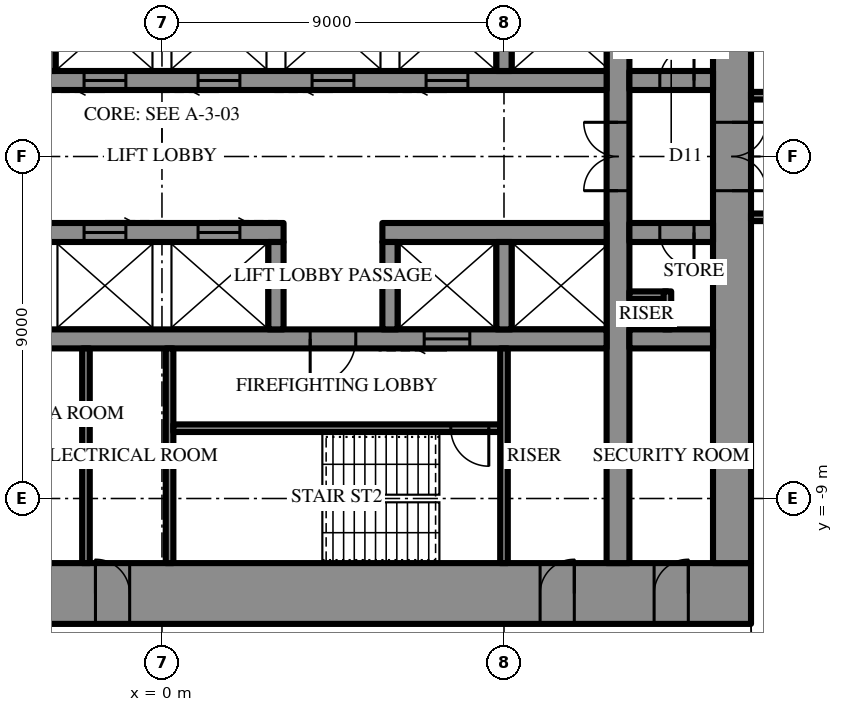
"""IFC4 building model, lengths in metres.
Left out: names, types, materials, properties, quantities, classifications, styles, units other than length and angle.
Written with IfcOpenShell. Run it as: python <this file> out.ifc"""

import sys

from ifc_helpers import new_model, si_unit, direction, frame, frame_2d, origin, place, context, subcontext, project, spatial, rectangle, extrude, element, fill, save


model = new_model("IFC4")
c1 = context("Model", 3, precision=1e-05, world=origin(), true_north=direction((0.0, 1.0)))
c2 = subcontext(c1, "Body", "Model", "MODEL_VIEW")
j1 = project(units=[si_unit("LENGTHUNIT", "METRE"), si_unit("PLANEANGLEUNIT", "RADIAN")], contexts=[c1])
p1 = place(None, origin())
s1 = spatial("IfcSite", under=j1, at=p1, CompositionType="ELEMENT")
p2 = place(p1, origin())
s2 = spatial("IfcBuilding", under=s1, at=p2, CompositionType="ELEMENT")
p3 = place(p2, frame((0.0, 0.0, 295.3)))
s3 = spatial("IfcBuildingStorey", under=s2, at=p3, CompositionType="ELEMENT", Elevation=295.3)
p4 = place(p3, frame((15.5, -11.5, 0.0), z_axis=(0.0, 0.0, 1.0), x_axis=(-1.0, 0.0, 0.0)))
e1 = element("IfcWall", 1, at=p4, inside=s3, PredefinedType="SHEAR", context=c2, shape_type="SweptSolid", body=[
    extrude(rectangle(XDim=31.0, YDim=1.6, at=frame_2d((15.5, 0.0))), origin(), (0.0, 0.0, 1.0), 4.2),
])
p5 = place(p4, frame((16.35, 0.0, 0.0)))
e2 = element("IfcOpeningElement", 2, at=p5, cuts=e1, PredefinedType="OPENING", context=c2, shape_type="SweptSolid", body=[
    extrude(rectangle(XDim=0.9, YDim=2.2, at=frame_2d((0.45, 1.1))), frame((0.0, 0.81, 0.0), z_axis=(0.0, -1.0, 0.0), x_axis=(1.0, 0.0, 0.0)), (0.0, 0.0, 1.0), 1.62),
])
p6 = place(p4, frame((19.35, 0.0, 0.0)))
e3 = element("IfcOpeningElement", 3, at=p6, cuts=e1, PredefinedType="OPENING", context=c2, shape_type="SweptSolid", body=[
    extrude(rectangle(XDim=0.9, YDim=2.2, at=frame_2d((0.45, 1.1))), frame((0.0, 0.81, 0.0), z_axis=(0.0, -1.0, 0.0), x_axis=(1.0, 0.0, 0.0)), (0.0, 0.0, 1.0), 1.62),
])
p7 = place(p4, frame((22.4, 0.0, 0.0)))
e4 = element("IfcOpeningElement", 4, at=p7, cuts=e1, PredefinedType="OPENING", context=c2, shape_type="SweptSolid", body=[
    extrude(rectangle(XDim=1.0, YDim=2.2, at=frame_2d((0.5, 1.1))), frame((0.0, 0.81, 0.0), z_axis=(0.0, -1.0, 0.0), x_axis=(1.0, 0.0, 0.0)), (0.0, 0.0, 1.0), 1.62),
])
p8 = place(p4, frame((1.65, 0.0, 0.0)))
e5 = element("IfcOpeningElement", 5, at=p8, cuts=e1, PredefinedType="OPENING", context=c2, shape_type="SweptSolid", body=[
    extrude(rectangle(XDim=0.9, YDim=2.2, at=frame_2d((0.45, 1.1))), frame((0.0, 0.81, 0.0), z_axis=(0.0, -1.0, 0.0), x_axis=(1.0, 0.0, 0.0)), (0.0, 0.0, 1.0), 1.62),
])
p9 = place(p4, frame((4.65, 0.0, 0.0)))
e6 = element("IfcOpeningElement", 6, at=p9, cuts=e1, PredefinedType="OPENING", context=c2, shape_type="SweptSolid", body=[
    extrude(rectangle(XDim=0.9, YDim=2.2, at=frame_2d((0.45, 1.1))), frame((0.0, 0.81, 0.0), z_axis=(0.0, -1.0, 0.0), x_axis=(1.0, 0.0, 0.0)), (0.0, 0.0, 1.0), 1.62),
])
p10 = place(p4, frame((25.45, 0.0, 0.0)))
e7 = element("IfcOpeningElement", 7, at=p10, cuts=e1, PredefinedType="OPENING", context=c2, shape_type="SweptSolid", body=[
    extrude(rectangle(XDim=0.9, YDim=2.2, at=frame_2d((0.45, 1.1))), frame((0.0, 0.81, 0.0), z_axis=(0.0, -1.0, 0.0), x_axis=(1.0, 0.0, 0.0)), (0.0, 0.0, 1.0), 1.62),
])
p11 = place(p4, frame((28.45, 0.0, 0.0)))
e8 = element("IfcOpeningElement", 8, at=p11, cuts=e1, PredefinedType="OPENING", context=c2, shape_type="SweptSolid", body=[
    extrude(rectangle(XDim=0.9, YDim=2.2, at=frame_2d((0.45, 1.1))), frame((0.0, 0.81, 0.0), z_axis=(0.0, -1.0, 0.0), x_axis=(1.0, 0.0, 0.0)), (0.0, 0.0, 1.0), 1.62),
])
p12 = place(p3, frame((15.0, -10.7, 0.0), z_axis=(0.0, 0.0, 1.0), x_axis=(0.0, 1.0, 0.0)))
e9 = element("IfcWall", 9, at=p12, inside=s3, PredefinedType="SHEAR", context=c2, shape_type="SweptSolid", body=[
    extrude(rectangle(XDim=21.4, YDim=1.0, at=frame_2d((10.7, 0.0))), origin(), (0.0, 0.0, 1.0), 4.2),
])
p13 = place(p12, frame((9.8, 0.0, 0.0)))
e10 = element("IfcOpeningElement", 10, at=p13, cuts=e9, PredefinedType="OPENING", context=c2, shape_type="SweptSolid", body=[
    extrude(rectangle(XDim=1.8, YDim=2.4, at=frame_2d((0.9, 1.2))), frame((0.0, 0.51, 0.0), z_axis=(0.0, -1.0, 0.0), x_axis=(1.0, 0.0, 0.0)), (0.0, 0.0, 1.0), 1.02),
])
p14 = place(p3, frame((12.0, -10.7, 0.0), z_axis=(0.0, 0.0, 1.0), x_axis=(0.0, 1.0, 0.0)))
e11 = element("IfcWall", 11, at=p14, inside=s3, PredefinedType="SHEAR", context=c2, shape_type="SweptSolid", body=[
    extrude(rectangle(XDim=21.4, YDim=0.6, at=frame_2d((10.7, 0.0))), origin(), (0.0, 0.0, 1.0), 4.2),
])
p15 = place(p14, frame((9.8, 0.0, 0.0)))
e12 = element("IfcOpeningElement", 12, at=p15, cuts=e11, PredefinedType="OPENING", context=c2, shape_type="SweptSolid", body=[
    extrude(rectangle(XDim=1.8, YDim=2.4, at=frame_2d((0.9, 1.2))), frame((0.0, 0.31, 0.0), z_axis=(0.0, -1.0, 0.0), x_axis=(1.0, 0.0, 0.0)), (0.0, 0.0, 1.0), 0.62),
])
p16 = place(p3, frame((-3.2, 2.0, 0.0), z_axis=(0.0, 0.0, 1.0), x_axis=(1.0, 0.0, 0.0)))
e13 = element("IfcWall", 13, at=p16, inside=s3, PredefinedType="SHEAR", context=c2, shape_type="SweptSolid", body=[
    extrude(rectangle(XDim=14.9, YDim=0.5, at=frame_2d((7.45, 0.0))), origin(), (0.0, 0.0, 1.0), 4.2),
])
p17 = place(p16, frame((1.15, 0.0, 0.0)))
e14 = element("IfcOpeningElement", 14, at=p17, cuts=e13, PredefinedType="OPENING", context=c2, shape_type="SweptSolid", body=[
    extrude(rectangle(XDim=1.1, YDim=2.2, at=frame_2d((0.55, 1.1))), frame((0.0, 0.26, 0.0), z_axis=(0.0, -1.0, 0.0), x_axis=(1.0, 0.0, 0.0)), (0.0, 0.0, 1.0), 0.52),
])
p18 = place(p16, frame((4.15, 0.0, 0.0)))
e15 = element("IfcOpeningElement", 15, at=p18, cuts=e13, PredefinedType="OPENING", context=c2, shape_type="SweptSolid", body=[
    extrude(rectangle(XDim=1.1, YDim=2.2, at=frame_2d((0.55, 1.1))), frame((0.0, 0.26, 0.0), z_axis=(0.0, -1.0, 0.0), x_axis=(1.0, 0.0, 0.0)), (0.0, 0.0, 1.0), 0.52),
])
p19 = place(p16, frame((7.15, 0.0, 0.0)))
e16 = element("IfcOpeningElement", 16, at=p19, cuts=e13, PredefinedType="OPENING", context=c2, shape_type="SweptSolid", body=[
    extrude(rectangle(XDim=1.1, YDim=2.2, at=frame_2d((0.55, 1.1))), frame((0.0, 0.26, 0.0), z_axis=(0.0, -1.0, 0.0), x_axis=(1.0, 0.0, 0.0)), (0.0, 0.0, 1.0), 0.52),
])
p20 = place(p16, frame((10.15, 0.0, 0.0)))
e17 = element("IfcOpeningElement", 17, at=p20, cuts=e13, PredefinedType="OPENING", context=c2, shape_type="SweptSolid", body=[
    extrude(rectangle(XDim=1.1, YDim=2.2, at=frame_2d((0.55, 1.1))), frame((0.0, 0.26, 0.0), z_axis=(0.0, -1.0, 0.0), x_axis=(1.0, 0.0, 0.0)), (0.0, 0.0, 1.0), 0.52),
])
p21 = place(p3, frame((12.3, 2.0, 0.0), z_axis=(0.0, 0.0, 1.0), x_axis=(1.0, 0.0, 0.0)))
e18 = element("IfcWall", 18, at=p21, inside=s3, PredefinedType="SHEAR", context=c2, shape_type="SweptSolid", body=[
    extrude(rectangle(XDim=2.2, YDim=0.5, at=frame_2d((1.1, 0.0))), origin(), (0.0, 0.0, 1.0), 4.2),
])
p22 = place(p21, frame((0.8, 0.0, 0.0)))
e19 = element("IfcOpeningElement", 19, at=p22, cuts=e18, PredefinedType="OPENING", context=c2, shape_type="SweptSolid", body=[
    extrude(rectangle(XDim=0.9, YDim=2.2, at=frame_2d((0.45, 1.1))), frame((0.0, 0.26, 0.0), z_axis=(0.0, -1.0, 0.0), x_axis=(1.0, 0.0, 0.0)), (0.0, 0.0, 1.0), 0.52),
])
for number, where, z_axis, x_axis in (
    (20, (-3.0, 2.25, 0.0), (0.0, 0.0, 1.0), (0.0, 1.0, 0.0)),
    (21, (9.0, 2.25, 0.0), (0.0, 0.0, 1.0), (0.0, 1.0, 0.0)),
):
    element("IfcWall", number, at=place(p3, frame(where, z_axis=z_axis, x_axis=x_axis)), inside=s3, PredefinedType="SHEAR", context=c2, shape_type="SweptSolid", body=[
        extrude(rectangle(XDim=2.3, YDim=0.4, at=frame_2d((1.15, 0.0))), origin(), (0.0, 0.0, 1.0), 4.2),
    ])
p23 = place(p3, frame((14.5, -2.0, 0.0), z_axis=(0.0, 0.0, 1.0), x_axis=(-1.0, 0.0, 0.0)))
e22 = element("IfcWall", 22, at=p23, inside=s3, PredefinedType="SHEAR", context=c2, shape_type="SweptSolid", body=[
    extrude(rectangle(XDim=2.2, YDim=0.5, at=frame_2d((1.1, 0.0))), origin(), (0.0, 0.0, 1.0), 4.2),
])
p24 = place(p23, frame((0.5, 0.0, 0.0)))
e23 = element("IfcOpeningElement", 23, at=p24, cuts=e22, PredefinedType="OPENING", context=c2, shape_type="SweptSolid", body=[
    extrude(rectangle(XDim=0.9, YDim=2.2, at=frame_2d((0.45, 1.1))), frame((0.0, 0.26, 0.0), z_axis=(0.0, -1.0, 0.0), x_axis=(1.0, 0.0, 0.0)), (0.0, 0.0, 1.0), 0.52),
])
p25 = place(p3, frame((11.7, -2.0, 0.0), z_axis=(0.0, 0.0, 1.0), x_axis=(-1.0, 0.0, 0.0)))
e24 = element("IfcWall", 24, at=p25, inside=s3, PredefinedType="SHEAR", context=c2, shape_type="SweptSolid", body=[
    extrude(rectangle(XDim=5.9, YDim=0.5, at=frame_2d((2.95, 0.0))), origin(), (0.0, 0.0, 1.0), 4.2),
])
p26 = place(p3, frame((3.2, -2.0, 0.0), z_axis=(0.0, 0.0, 1.0), x_axis=(-1.0, 0.0, 0.0)))
e25 = element("IfcWall", 25, at=p26, inside=s3, PredefinedType="SHEAR", context=c2, shape_type="SweptSolid", body=[
    extrude(rectangle(XDim=14.9, YDim=0.5, at=frame_2d((7.45, 0.0))), origin(), (0.0, 0.0, 1.0), 4.2),
])
p27 = place(p26, frame((1.15, 0.0, 0.0)))
e26 = element("IfcOpeningElement", 26, at=p27, cuts=e25, PredefinedType="OPENING", context=c2, shape_type="SweptSolid", body=[
    extrude(rectangle(XDim=1.1, YDim=2.2, at=frame_2d((0.55, 1.1))), frame((0.0, 0.26, 0.0), z_axis=(0.0, -1.0, 0.0), x_axis=(1.0, 0.0, 0.0)), (0.0, 0.0, 1.0), 0.52),
])
p28 = place(p26, frame((4.15, 0.0, 0.0)))
e27 = element("IfcOpeningElement", 27, at=p28, cuts=e25, PredefinedType="OPENING", context=c2, shape_type="SweptSolid", body=[
    extrude(rectangle(XDim=1.1, YDim=2.2, at=frame_2d((0.55, 1.1))), frame((0.0, 0.26, 0.0), z_axis=(0.0, -1.0, 0.0), x_axis=(1.0, 0.0, 0.0)), (0.0, 0.0, 1.0), 0.52),
])
p29 = place(p26, frame((7.15, 0.0, 0.0)))
e28 = element("IfcOpeningElement", 28, at=p29, cuts=e25, PredefinedType="OPENING", context=c2, shape_type="SweptSolid", body=[
    extrude(rectangle(XDim=1.1, YDim=2.2, at=frame_2d((0.55, 1.1))), frame((0.0, 0.26, 0.0), z_axis=(0.0, -1.0, 0.0), x_axis=(1.0, 0.0, 0.0)), (0.0, 0.0, 1.0), 0.52),
])
p30 = place(p26, frame((10.15, 0.0, 0.0)))
e29 = element("IfcOpeningElement", 29, at=p30, cuts=e25, PredefinedType="OPENING", context=c2, shape_type="SweptSolid", body=[
    extrude(rectangle(XDim=1.1, YDim=2.2, at=frame_2d((0.55, 1.1))), frame((0.0, 0.26, 0.0), z_axis=(0.0, -1.0, 0.0), x_axis=(1.0, 0.0, 0.0)), (0.0, 0.0, 1.0), 0.52),
])
p31 = place(p3, frame((14.5, -4.8, 0.0), z_axis=(0.0, 0.0, 1.0), x_axis=(-1.0, 0.0, 0.0)))
e30 = element("IfcWall", 30, at=p31, inside=s3, PredefinedType="SHEAR", context=c2, shape_type="SweptSolid", body=[
    extrude(rectangle(XDim=2.2, YDim=0.5, at=frame_2d((1.1, 0.0))), origin(), (0.0, 0.0, 1.0), 4.2),
])
p32 = place(p3, frame((11.7, -4.8, 0.0), z_axis=(0.0, 0.0, 1.0), x_axis=(-1.0, 0.0, 0.0)))
e31 = element("IfcWall", 31, at=p32, inside=s3, PredefinedType="SHEAR", context=c2, shape_type="SweptSolid", body=[
    extrude(rectangle(XDim=23.4, YDim=0.5, at=frame_2d((11.7, 0.0))), origin(), (0.0, 0.0, 1.0), 4.2),
])
p33 = place(p32, frame((6.6, 0.0, 0.0)))
e32 = element("IfcOpeningElement", 32, at=p33, cuts=e31, PredefinedType="OPENING", context=c2, shape_type="SweptSolid", body=[
    extrude(rectangle(XDim=1.2, YDim=2.2, at=frame_2d((0.6, 1.1))), frame((0.0, 0.26, 0.0), z_axis=(0.0, -1.0, 0.0), x_axis=(1.0, 0.0, 0.0)), (0.0, 0.0, 1.0), 0.52),
])
p34 = place(p32, frame((3.6, 0.0, 0.0)))
e33 = element("IfcOpeningElement", 33, at=p34, cuts=e31, PredefinedType="OPENING", context=c2, shape_type="SweptSolid", body=[
    extrude(rectangle(XDim=1.2, YDim=2.2, at=frame_2d((0.6, 1.1))), frame((0.0, 0.26, 0.0), z_axis=(0.0, -1.0, 0.0), x_axis=(1.0, 0.0, 0.0)), (0.0, 0.0, 1.0), 0.52),
])
for number, where, z_axis, x_axis in (
    (34, (9.0, -2.25, 0.0), (0.0, 0.0, 1.0), (0.0, -1.0, 0.0)),
    (35, (6.0, -2.25, 0.0), (0.0, 0.0, 1.0), (0.0, -1.0, 0.0)),
    (36, (3.0, -2.25, 0.0), (0.0, 0.0, 1.0), (0.0, -1.0, 0.0)),
):
    element("IfcWall", number, at=place(p3, frame(where, z_axis=z_axis, x_axis=x_axis)), inside=s3, PredefinedType="SHEAR", context=c2, shape_type="SweptSolid", body=[
        extrude(rectangle(XDim=2.3, YDim=0.4, at=frame_2d((1.15, 0.0))), origin(), (0.0, 0.0, 1.0), 4.2),
    ])
p35 = place(p3, frame((0.2, -5.05, 0.0), z_axis=(0.0, 0.0, 1.0), x_axis=(0.0, -1.0, 0.0)))
e37 = element("IfcWall", 37, at=p35, inside=s3, PredefinedType="SHEAR", context=c2, shape_type="SweptSolid", body=[
    extrude(rectangle(XDim=5.65, YDim=0.2, at=frame_2d((2.825, 0.0))), origin(), (0.0, 0.0, 1.0), 4.2),
])
p36 = place(p3, frame((8.9, -7.15, 0.0), z_axis=(0.0, 0.0, 1.0), x_axis=(-1.0, 0.0, 0.0)))
e38 = element("IfcWall", 38, at=p36, inside=s3, PredefinedType="SHEAR", context=c2, shape_type="SweptSolid", body=[
    extrude(rectangle(XDim=8.6, YDim=0.2, at=frame_2d((4.3, 0.0))), origin(), (0.0, 0.0, 1.0), 4.2),
])
p37 = place(p36, frame((0.3, 0.0, 0.0)))
e39 = element("IfcOpeningElement", 39, at=p37, cuts=e38, PredefinedType="OPENING", context=c2, shape_type="SweptSolid", body=[
    extrude(rectangle(XDim=1.0, YDim=2.2, at=frame_2d((0.5, 1.1))), frame((0.0, 0.11, 0.0), z_axis=(0.0, -1.0, 0.0), x_axis=(1.0, 0.0, 0.0)), (0.0, 0.0, 1.0), 0.22),
])
for number, where, z_axis, x_axis in (
    (40, (9.0, -5.05, 0.0), (0.0, 0.0, 1.0), (0.0, -1.0, 0.0)),
    (41, (-2.0, -5.05, 0.0), (0.0, 0.0, 1.0), (0.0, -1.0, 0.0)),
):
    element("IfcWall", number, at=place(p3, frame(where, z_axis=z_axis, x_axis=x_axis)), inside=s3, PredefinedType="PARTITIONING", context=c2, shape_type="SweptSolid", body=[
        extrude(rectangle(XDim=5.65, YDim=0.2, at=frame_2d((2.825, 0.0))), origin(), (0.0, 0.0, 1.0), 3.9),
    ])
for number, where, z_axis, x_axis in (
    (42, (13.3, -3.65, 0.0), (0.0, 0.0, 1.0), (-1.0, 0.0, 0.0)),
    (43, (13.3, -3.55, 0.0), (0.0, 0.0, 1.0), (0.0, -1.0, 0.0)),
):
    element("IfcWall", number, at=place(p3, frame(where, z_axis=z_axis, x_axis=x_axis)), inside=s3, PredefinedType="PARTITIONING", context=c2, shape_type="SweptSolid", body=[
        extrude(rectangle(XDim=1.0, YDim=0.2, at=frame_2d((0.5, 0.0))), origin(), (0.0, 0.0, 1.0), 3.9),
    ])
p38 = place(p3, frame((15.5, 1.6, 0.0), z_axis=(0.0, 0.0, 1.0), x_axis=(1.0, 0.0, 0.0)))
e44 = element("IfcWall", 44, at=p38, inside=s3, PredefinedType="PARTITIONING", context=c2, shape_type="SweptSolid", body=[
    extrude(rectangle(XDim=12.2, YDim=0.2, at=frame_2d((6.1, 0.0))), origin(), (0.0, 0.0, 1.0), 3.9),
])
p39 = place(p38, frame((8.04, 0.0, 0.0)))
e45 = element("IfcOpeningElement", 45, at=p39, cuts=e44, PredefinedType="OPENING", context=c2, shape_type="SweptSolid", body=[
    extrude(rectangle(XDim=1.0, YDim=2.2, at=frame_2d((0.5, 1.1))), frame((0.0, 0.11, 0.0), z_axis=(0.0, -1.0, 0.0), x_axis=(1.0, 0.0, 0.0)), (0.0, 0.0, 1.0), 0.22),
])
p40 = place(p3, frame((15.5, -1.6, 0.0), z_axis=(0.0, 0.0, 1.0), x_axis=(1.0, 0.0, 0.0)))
e46 = element("IfcWall", 46, at=p40, inside=s3, PredefinedType="PARTITIONING", context=c2, shape_type="SweptSolid", body=[
    extrude(rectangle(XDim=12.2, YDim=0.2, at=frame_2d((6.1, 0.0))), origin(), (0.0, 0.0, 1.0), 3.9),
])
p41 = place(p40, frame((8.04, 0.0, 0.0)))
e47 = element("IfcOpeningElement", 47, at=p41, cuts=e46, PredefinedType="OPENING", context=c2, shape_type="SweptSolid", body=[
    extrude(rectangle(XDim=1.0, YDim=2.2, at=frame_2d((0.5, 1.1))), frame((0.0, 0.11, 0.0), z_axis=(0.0, -1.0, 0.0), x_axis=(1.0, 0.0, 0.0)), (0.0, 0.0, 1.0), 0.22),
])
p42 = place(p13, frame((1.8, 0.0, 0.0), z_axis=(0.0, 0.0, 1.0), x_axis=(-1.0, 0.0, 0.0)))
e48 = element("IfcDoor", 48, at=p42, inside=s3, OperationType="DOUBLE_DOOR_SINGLE_SWING", PredefinedType="DOOR", context=c2, shape_type="SweptSolid", body=[
    extrude(rectangle(XDim=1.8, YDim=2.4, at=frame_2d((0.9, 1.2))), frame((0.0, 0.025, 0.0), z_axis=(0.0, -1.0, 0.0), x_axis=(1.0, 0.0, 0.0)), (0.0, 0.0, 1.0), 0.05),
])
fill(e10, e48)
p43 = place(p33, origin())
e49 = element("IfcDoor", 49, at=p43, inside=s3, OperationType="SINGLE_SWING_LEFT", PredefinedType="DOOR", context=c2, shape_type="SweptSolid", body=[
    extrude(rectangle(XDim=1.2, YDim=2.2, at=frame_2d((0.6, 1.1))), frame((0.0, 0.025, 0.0), z_axis=(0.0, -1.0, 0.0), x_axis=(1.0, 0.0, 0.0)), (0.0, 0.0, 1.0), 0.05),
])
fill(e32, e49)
p44 = place(p37, origin())
e50 = element("IfcDoor", 50, at=p44, inside=s3, OperationType="SINGLE_SWING_RIGHT", PredefinedType="DOOR", context=c2, shape_type="SweptSolid", body=[
    extrude(rectangle(XDim=1.0, YDim=2.2, at=frame_2d((0.5, 1.1))), frame((0.0, 0.025, 0.0), z_axis=(0.0, -1.0, 0.0), x_axis=(1.0, 0.0, 0.0)), (0.0, 0.0, 1.0), 0.05),
])
fill(e39, e50)
p45 = place(p5, frame((0.9, 0.0, 0.0), z_axis=(0.0, 0.0, 1.0), x_axis=(-1.0, 0.0, 0.0)))
e51 = element("IfcDoor", 51, at=p45, inside=s3, OperationType="SINGLE_SWING_RIGHT", PredefinedType="DOOR", context=c2, shape_type="SweptSolid", body=[
    extrude(rectangle(XDim=0.9, YDim=2.2, at=frame_2d((0.45, 1.1))), frame((0.0, 0.025, 0.0), z_axis=(0.0, -1.0, 0.0), x_axis=(1.0, 0.0, 0.0)), (0.0, 0.0, 1.0), 0.05),
])
fill(e2, e51)
p46 = place(p8, frame((0.9, 0.0, 0.0), z_axis=(0.0, 0.0, 1.0), x_axis=(-1.0, 0.0, 0.0)))
e52 = element("IfcDoor", 52, at=p46, inside=s3, OperationType="SINGLE_SWING_LEFT", PredefinedType="DOOR", context=c2, shape_type="SweptSolid", body=[
    extrude(rectangle(XDim=0.9, YDim=2.2, at=frame_2d((0.45, 1.1))), frame((0.0, 0.025, 0.0), z_axis=(0.0, -1.0, 0.0), x_axis=(1.0, 0.0, 0.0)), (0.0, 0.0, 1.0), 0.05),
])
fill(e5, e52)
p47 = place(p9, frame((0.9, 0.0, 0.0), z_axis=(0.0, 0.0, 1.0), x_axis=(-1.0, 0.0, 0.0)))
e53 = element("IfcDoor", 53, at=p47, inside=s3, OperationType="SINGLE_SWING_LEFT", PredefinedType="DOOR", context=c2, shape_type="SweptSolid", body=[
    extrude(rectangle(XDim=0.9, YDim=2.2, at=frame_2d((0.45, 1.1))), frame((0.0, 0.025, 0.0), z_axis=(0.0, -1.0, 0.0), x_axis=(1.0, 0.0, 0.0)), (0.0, 0.0, 1.0), 0.05),
])
fill(e6, e53)
p48 = place(p22, origin())
e54 = element("IfcDoor", 54, at=p48, inside=s3, OperationType="SINGLE_SWING_LEFT", PredefinedType="DOOR", context=c2, shape_type="SweptSolid", body=[
    extrude(rectangle(XDim=0.9, YDim=2.2, at=frame_2d((0.45, 1.1))), frame((0.0, 0.025, 0.0), z_axis=(0.0, -1.0, 0.0), x_axis=(1.0, 0.0, 0.0)), (0.0, 0.0, 1.0), 0.05),
])
fill(e19, e54)
p49 = place(p24, origin())
e55 = element("IfcDoor", 55, at=p49, inside=s3, OperationType="SINGLE_SWING_RIGHT", PredefinedType="DOOR", context=c2, shape_type="SweptSolid", body=[
    extrude(rectangle(XDim=0.9, YDim=2.2, at=frame_2d((0.45, 1.1))), frame((0.0, 0.025, 0.0), z_axis=(0.0, -1.0, 0.0), x_axis=(1.0, 0.0, 0.0)), (0.0, 0.0, 1.0), 0.05),
])
fill(e23, e55)
p50 = place(p15, origin())
e56 = element("IfcDoor", 56, at=p50, inside=s3, OperationType="DOUBLE_DOOR_SINGLE_SWING", PredefinedType="DOOR", context=c2, shape_type="SweptSolid", body=[
    extrude(rectangle(XDim=1.8, YDim=2.4, at=frame_2d((0.9, 1.2))), frame((0.0, 0.025, 0.0), z_axis=(0.0, -1.0, 0.0), x_axis=(1.0, 0.0, 0.0)), (0.0, 0.0, 1.0), 0.05),
])
fill(e12, e56)
p51 = place(p17, frame((1.1, 0.0, 0.0), z_axis=(0.0, 0.0, 1.0), x_axis=(-1.0, 0.0, 0.0)))
e57 = element("IfcDoor", 57, at=p51, inside=s3, OperationType="SLIDING_TO_LEFT", PredefinedType="DOOR", context=c2, shape_type="SweptSolid", body=[
    extrude(rectangle(XDim=1.1, YDim=2.2, at=frame_2d((0.55, 1.1))), frame((0.0, 0.025, 0.0), z_axis=(0.0, -1.0, 0.0), x_axis=(1.0, 0.0, 0.0)), (0.0, 0.0, 1.0), 0.05),
])
fill(e14, e57)
p52 = place(p18, frame((1.1, 0.0, 0.0), z_axis=(0.0, 0.0, 1.0), x_axis=(-1.0, 0.0, 0.0)))
e58 = element("IfcDoor", 58, at=p52, inside=s3, OperationType="SLIDING_TO_LEFT", PredefinedType="DOOR", context=c2, shape_type="SweptSolid", body=[
    extrude(rectangle(XDim=1.1, YDim=2.2, at=frame_2d((0.55, 1.1))), frame((0.0, 0.025, 0.0), z_axis=(0.0, -1.0, 0.0), x_axis=(1.0, 0.0, 0.0)), (0.0, 0.0, 1.0), 0.05),
])
fill(e15, e58)
p53 = place(p19, frame((1.1, 0.0, 0.0), z_axis=(0.0, 0.0, 1.0), x_axis=(-1.0, 0.0, 0.0)))
e59 = element("IfcDoor", 59, at=p53, inside=s3, OperationType="SLIDING_TO_LEFT", PredefinedType="DOOR", context=c2, shape_type="SweptSolid", body=[
    extrude(rectangle(XDim=1.1, YDim=2.2, at=frame_2d((0.55, 1.1))), frame((0.0, 0.025, 0.0), z_axis=(0.0, -1.0, 0.0), x_axis=(1.0, 0.0, 0.0)), (0.0, 0.0, 1.0), 0.05),
])
fill(e16, e59)
p54 = place(p20, frame((1.1, 0.0, 0.0), z_axis=(0.0, 0.0, 1.0), x_axis=(-1.0, 0.0, 0.0)))
e60 = element("IfcDoor", 60, at=p54, inside=s3, OperationType="SLIDING_TO_LEFT", PredefinedType="DOOR", context=c2, shape_type="SweptSolid", body=[
    extrude(rectangle(XDim=1.1, YDim=2.2, at=frame_2d((0.55, 1.1))), frame((0.0, 0.025, 0.0), z_axis=(0.0, -1.0, 0.0), x_axis=(1.0, 0.0, 0.0)), (0.0, 0.0, 1.0), 0.05),
])
fill(e17, e60)
p55 = place(p34, origin())
e61 = element("IfcDoor", 61, at=p55, inside=s3, OperationType="SLIDING_TO_LEFT", PredefinedType="DOOR", context=c2, shape_type="SweptSolid", body=[
    extrude(rectangle(XDim=1.2, YDim=2.2, at=frame_2d((0.6, 1.1))), frame((0.0, 0.025, 0.0), z_axis=(0.0, -1.0, 0.0), x_axis=(1.0, 0.0, 0.0)), (0.0, 0.0, 1.0), 0.05),
])
fill(e33, e61)
p56 = place(p27, frame((1.1, 0.0, 0.0), z_axis=(0.0, 0.0, 1.0), x_axis=(-1.0, 0.0, 0.0)))
e62 = element("IfcDoor", 62, at=p56, inside=s3, OperationType="SLIDING_TO_LEFT", PredefinedType="DOOR", context=c2, shape_type="SweptSolid", body=[
    extrude(rectangle(XDim=1.1, YDim=2.2, at=frame_2d((0.55, 1.1))), frame((0.0, 0.025, 0.0), z_axis=(0.0, -1.0, 0.0), x_axis=(1.0, 0.0, 0.0)), (0.0, 0.0, 1.0), 0.05),
])
fill(e26, e62)
p57 = place(p28, frame((1.1, 0.0, 0.0), z_axis=(0.0, 0.0, 1.0), x_axis=(-1.0, 0.0, 0.0)))
e63 = element("IfcDoor", 63, at=p57, inside=s3, OperationType="SLIDING_TO_LEFT", PredefinedType="DOOR", context=c2, shape_type="SweptSolid", body=[
    extrude(rectangle(XDim=1.1, YDim=2.2, at=frame_2d((0.55, 1.1))), frame((0.0, 0.025, 0.0), z_axis=(0.0, -1.0, 0.0), x_axis=(1.0, 0.0, 0.0)), (0.0, 0.0, 1.0), 0.05),
])
fill(e27, e63)
save(model, sys.argv[1])
